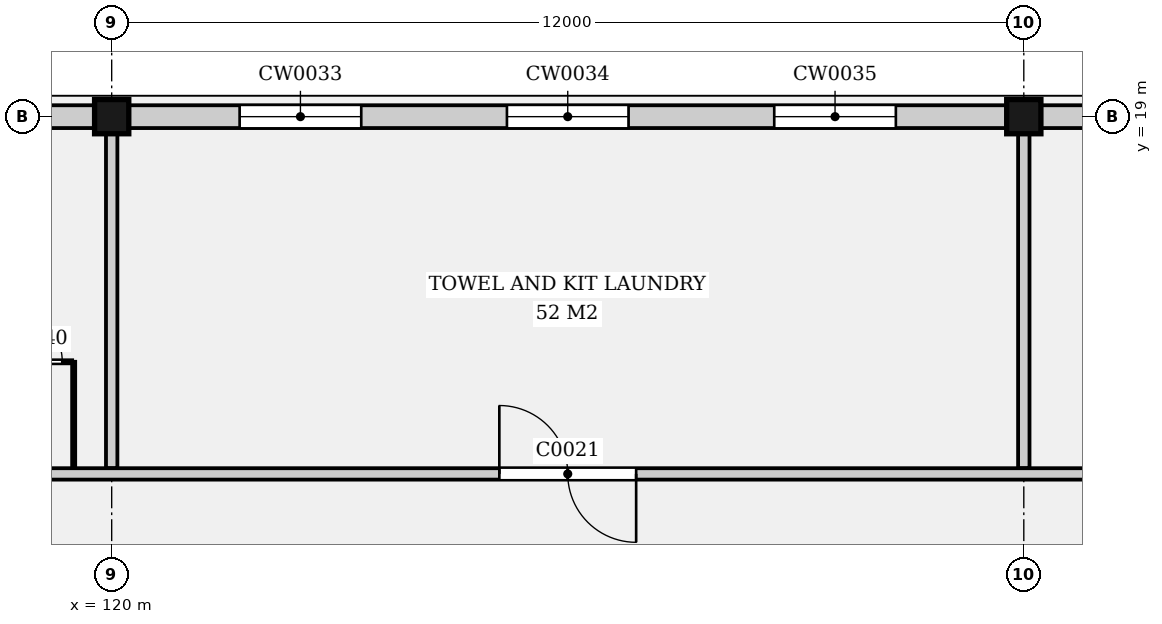
"""IFC4 building model, lengths in metres.
Left out: names, types, materials, properties, quantities, classifications, styles, units other than length and angle.
Written with IfcOpenShell. Run it as: python <this file> out.ifc"""

import sys

from ifc_helpers import new_model, si_unit, direction, frame, frame_2d, origin, origin_2d, place, context, subcontext, project, spatial, rectangle, extrude, element, fill, save


model = new_model("IFC4")
c1 = context("Model", 3, precision=1e-05, world=origin(), true_north=direction((0.0, 1.0)))
c2 = subcontext(c1, "Body", "Model", "MODEL_VIEW")
j1 = project(units=[si_unit("LENGTHUNIT", "METRE"), si_unit("PLANEANGLEUNIT", "RADIAN")], contexts=[c1])
p1 = place(None, origin())
s1 = spatial("IfcSite", under=j1, at=p1, CompositionType="ELEMENT")
p2 = place(p1, origin())
s2 = spatial("IfcBuilding", under=s1, at=p2, CompositionType="ELEMENT")
p3 = place(p2, origin())
s3 = spatial("IfcBuildingStorey", under=s2, at=p3, CompositionType="ELEMENT", Elevation=0.0)
for number, where, z_axis, x_axis in (
    (1, (120.0, 19.0, -0.25), (0.0, 0.0, 1.0), (1.0, 0.0, 0.0)),
    (2, (132.0, 19.0, -0.25), (0.0, 0.0, 1.0), (1.0, 0.0, 0.0)),
):
    element("IfcColumn", number, at=place(p3, frame(where, z_axis=z_axis, x_axis=x_axis)), inside=s3, PredefinedType="COLUMN", context=c2, shape_type="SweptSolid", body=[
        extrude(rectangle(XDim=0.45, YDim=0.45, at=origin_2d()), origin(), (0.0, 0.0, 1.0), 5.25),
    ])
p4 = place(p3, frame((108.225, 19.0, 0.0), z_axis=(0.0, 0.0, 1.0), x_axis=(1.0, 0.0, 0.0)))
e3 = element("IfcWall", 3, at=p4, inside=s3, PredefinedType="ELEMENTEDWALL", context=c2, shape_type="SweptSolid", body=[
    extrude(rectangle(XDim=11.55, YDim=0.3, at=frame_2d((5.775, 0.0))), origin(), (0.0, 0.0, 1.0), 4.6),
])
p5 = place(p4, frame((1.458, 0.0, 2.5)))
e4 = element("IfcOpeningElement", 4, at=p5, cuts=e3, PredefinedType="OPENING", context=c2, shape_type="SweptSolid", body=[
    extrude(rectangle(XDim=1.6, YDim=1.0, at=frame_2d((0.8, 0.5))), frame((0.0, 0.16, 0.0), z_axis=(0.0, -1.0, 0.0), x_axis=(1.0, 0.0, 0.0)), (0.0, 0.0, 1.0), 0.32),
])
p6 = place(p4, frame((8.492, 0.0, 2.5)))
e5 = element("IfcOpeningElement", 5, at=p6, cuts=e3, PredefinedType="OPENING", context=c2, shape_type="SweptSolid", body=[
    extrude(rectangle(XDim=1.6, YDim=1.0, at=frame_2d((0.8, 0.5))), frame((0.0, 0.16, 0.0), z_axis=(0.0, -1.0, 0.0), x_axis=(1.0, 0.0, 0.0)), (0.0, 0.0, 1.0), 0.32),
])
p7 = place(p4, frame((3.875, 0.0, 0.0)))
e6 = element("IfcOpeningElement", 6, at=p7, cuts=e3, PredefinedType="OPENING", context=c2, shape_type="SweptSolid", body=[
    extrude(rectangle(XDim=1.8, YDim=2.4, at=frame_2d((0.9, 1.2))), frame((0.0, 0.16, 0.0), z_axis=(0.0, -1.0, 0.0), x_axis=(1.0, 0.0, 0.0)), (0.0, 0.0, 1.0), 0.32),
])
p8 = place(p3, frame((120.225, 19.0, 0.0), z_axis=(0.0, 0.0, 1.0), x_axis=(1.0, 0.0, 0.0)))
e7 = element("IfcWall", 7, at=p8, inside=s3, PredefinedType="ELEMENTEDWALL", context=c2, shape_type="SweptSolid", body=[
    extrude(rectangle(XDim=11.55, YDim=0.3, at=frame_2d((5.775, 0.0))), origin(), (0.0, 0.0, 1.0), 4.6),
])
p9 = place(p8, frame((1.458, 0.0, 2.5)))
e8 = element("IfcOpeningElement", 8, at=p9, cuts=e7, PredefinedType="OPENING", context=c2, shape_type="SweptSolid", body=[
    extrude(rectangle(XDim=1.6, YDim=1.0, at=frame_2d((0.8, 0.5))), frame((0.0, 0.16, 0.0), z_axis=(0.0, -1.0, 0.0), x_axis=(1.0, 0.0, 0.0)), (0.0, 0.0, 1.0), 0.32),
])
p10 = place(p8, frame((4.975, 0.0, 2.5)))
e9 = element("IfcOpeningElement", 9, at=p10, cuts=e7, PredefinedType="OPENING", context=c2, shape_type="SweptSolid", body=[
    extrude(rectangle(XDim=1.6, YDim=1.0, at=frame_2d((0.8, 0.5))), frame((0.0, 0.16, 0.0), z_axis=(0.0, -1.0, 0.0), x_axis=(1.0, 0.0, 0.0)), (0.0, 0.0, 1.0), 0.32),
])
p11 = place(p8, frame((8.492, 0.0, 2.5)))
e10 = element("IfcOpeningElement", 10, at=p11, cuts=e7, PredefinedType="OPENING", context=c2, shape_type="SweptSolid", body=[
    extrude(rectangle(XDim=1.6, YDim=1.0, at=frame_2d((0.8, 0.5))), frame((0.0, 0.16, 0.0), z_axis=(0.0, -1.0, 0.0), x_axis=(1.0, 0.0, 0.0)), (0.0, 0.0, 1.0), 0.32),
])
p12 = place(p3, frame((132.225, 19.0, 0.0), z_axis=(0.0, 0.0, 1.0), x_axis=(1.0, 0.0, 0.0)))
e11 = element("IfcWall", 11, at=p12, inside=s3, PredefinedType="ELEMENTEDWALL", context=c2, shape_type="SweptSolid", body=[
    extrude(rectangle(XDim=11.55, YDim=0.3, at=frame_2d((5.775, 0.0))), origin(), (0.0, 0.0, 1.0), 4.6),
])
p13 = place(p12, frame((1.458, 0.0, 2.5)))
e12 = element("IfcOpeningElement", 12, at=p13, cuts=e11, PredefinedType="OPENING", context=c2, shape_type="SweptSolid", body=[
    extrude(rectangle(XDim=1.6, YDim=1.0, at=frame_2d((0.8, 0.5))), frame((0.0, 0.16, 0.0), z_axis=(0.0, -1.0, 0.0), x_axis=(1.0, 0.0, 0.0)), (0.0, 0.0, 1.0), 0.32),
])
p14 = place(p12, frame((8.492, 0.0, 2.5)))
e13 = element("IfcOpeningElement", 13, at=p14, cuts=e11, PredefinedType="OPENING", context=c2, shape_type="SweptSolid", body=[
    extrude(rectangle(XDim=1.6, YDim=1.0, at=frame_2d((0.8, 0.5))), frame((0.0, 0.16, 0.0), z_axis=(0.0, -1.0, 0.0), x_axis=(1.0, 0.0, 0.0)), (0.0, 0.0, 1.0), 0.32),
])
p15 = place(p12, frame((4.875, 0.0, 0.0)))
e14 = element("IfcOpeningElement", 14, at=p15, cuts=e11, PredefinedType="OPENING", context=c2, shape_type="SweptSolid", body=[
    extrude(rectangle(XDim=1.8, YDim=2.4, at=frame_2d((0.9, 1.2))), frame((0.0, 0.16, 0.0), z_axis=(0.0, -1.0, 0.0), x_axis=(1.0, 0.0, 0.0)), (0.0, 0.0, 1.0), 0.32),
])
p16 = place(p3, frame((55.3, 14.3, 0.0), z_axis=(0.0, 0.0, 1.0), x_axis=(1.0, 0.0, 0.0)))
e15 = element("IfcWall", 15, at=p16, inside=s3, PredefinedType="PARTITIONING", context=c2, shape_type="SweptSolid", body=[
    extrude(rectangle(XDim=93.4, YDim=0.15, at=frame_2d((46.7, 0.0))), origin(), (0.0, 0.0, 1.0), 4.6),
])
p17 = place(p16, frame((15.8, 0.0, 0.0)))
e16 = element("IfcOpeningElement", 16, at=p17, cuts=e15, PredefinedType="OPENING", context=c2, shape_type="SweptSolid", body=[
    extrude(rectangle(XDim=1.8, YDim=2.4, at=frame_2d((0.9, 1.2))), frame((0.0, 0.085, 0.0), z_axis=(0.0, -1.0, 0.0), x_axis=(1.0, 0.0, 0.0)), (0.0, 0.0, 1.0), 0.17),
])
p18 = place(p16, frame((32.2, 0.0, 0.0)))
e17 = element("IfcOpeningElement", 17, at=p18, cuts=e15, PredefinedType="OPENING", context=c2, shape_type="SweptSolid", body=[
    extrude(rectangle(XDim=1.0, YDim=2.1, at=frame_2d((0.5, 1.05))), frame((0.0, 0.085, 0.0), z_axis=(0.0, -1.0, 0.0), x_axis=(1.0, 0.0, 0.0)), (0.0, 0.0, 1.0), 0.17),
])
p19 = place(p16, frame((38.2, 0.0, 0.0)))
e18 = element("IfcOpeningElement", 18, at=p19, cuts=e15, PredefinedType="OPENING", context=c2, shape_type="SweptSolid", body=[
    extrude(rectangle(XDim=1.0, YDim=2.1, at=frame_2d((0.5, 1.05))), frame((0.0, 0.085, 0.0), z_axis=(0.0, -1.0, 0.0), x_axis=(1.0, 0.0, 0.0)), (0.0, 0.0, 1.0), 0.17),
])
p20 = place(p16, frame((43.2, 0.0, 0.0)))
e19 = element("IfcOpeningElement", 19, at=p20, cuts=e15, PredefinedType="OPENING", context=c2, shape_type="SweptSolid", body=[
    extrude(rectangle(XDim=1.0, YDim=2.1, at=frame_2d((0.5, 1.05))), frame((0.0, 0.085, 0.0), z_axis=(0.0, -1.0, 0.0), x_axis=(1.0, 0.0, 0.0)), (0.0, 0.0, 1.0), 0.17),
])
p21 = place(p16, frame((49.2, 0.0, 0.0)))
e20 = element("IfcOpeningElement", 20, at=p21, cuts=e15, PredefinedType="OPENING", context=c2, shape_type="SweptSolid", body=[
    extrude(rectangle(XDim=1.0, YDim=2.1, at=frame_2d((0.5, 1.05))), frame((0.0, 0.085, 0.0), z_axis=(0.0, -1.0, 0.0), x_axis=(1.0, 0.0, 0.0)), (0.0, 0.0, 1.0), 0.17),
])
p22 = place(p16, frame((57.8, 0.0, 0.0)))
e21 = element("IfcOpeningElement", 21, at=p22, cuts=e15, PredefinedType="OPENING", context=c2, shape_type="SweptSolid", body=[
    extrude(rectangle(XDim=1.8, YDim=2.4, at=frame_2d((0.9, 1.2))), frame((0.0, 0.085, 0.0), z_axis=(0.0, -1.0, 0.0), x_axis=(1.0, 0.0, 0.0)), (0.0, 0.0, 1.0), 0.17),
])
p23 = place(p16, frame((69.8, 0.0, 0.0)))
e22 = element("IfcOpeningElement", 22, at=p23, cuts=e15, PredefinedType="OPENING", context=c2, shape_type="SweptSolid", body=[
    extrude(rectangle(XDim=1.8, YDim=2.4, at=frame_2d((0.9, 1.2))), frame((0.0, 0.085, 0.0), z_axis=(0.0, -1.0, 0.0), x_axis=(1.0, 0.0, 0.0)), (0.0, 0.0, 1.0), 0.17),
])
p24 = place(p16, frame((82.2, 0.0, 0.0)))
e23 = element("IfcOpeningElement", 23, at=p24, cuts=e15, PredefinedType="OPENING", context=c2, shape_type="SweptSolid", body=[
    extrude(rectangle(XDim=1.0, YDim=2.1, at=frame_2d((0.5, 1.05))), frame((0.0, 0.085, 0.0), z_axis=(0.0, -1.0, 0.0), x_axis=(1.0, 0.0, 0.0)), (0.0, 0.0, 1.0), 0.17),
])
for number, where, z_axis, x_axis in (
    (24, (120.0, 14.375, 0.0), (0.0, 0.0, 1.0), (0.0, 1.0, 0.0)),
    (25, (132.0, 14.375, 0.0), (0.0, 0.0, 1.0), (0.0, 1.0, 0.0)),
):
    element("IfcWall", number, at=place(p3, frame(where, z_axis=z_axis, x_axis=x_axis)), inside=s3, PredefinedType="PARTITIONING", context=c2, shape_type="SweptSolid", body=[
        extrude(rectangle(XDim=4.4, YDim=0.15, at=frame_2d((2.2, 0.0))), origin(), (0.0, 0.0, 1.0), 4.6),
    ])
p25 = place(p3, frame((119.5, 14.375, 0.0), z_axis=(0.0, 0.0, 1.0), x_axis=(0.0, 1.0, 0.0)))
e26 = element("IfcWall", 26, at=p25, inside=s3, PredefinedType="PARTITIONING", context=c2, shape_type="SweptSolid", body=[
    extrude(rectangle(XDim=1.4, YDim=0.04, at=frame_2d((0.7, 0.0))), origin(), (0.0, 0.0, 1.0), 2.4),
])
p26 = place(p3, frame((118.52, 15.775, 0.0), z_axis=(0.0, 0.0, 1.0), x_axis=(1.0, 0.0, 0.0)))
e27 = element("IfcWall", 27, at=p26, inside=s3, PredefinedType="PARTITIONING", context=c2, shape_type="SweptSolid", body=[
    extrude(rectangle(XDim=0.96, YDim=0.04, at=frame_2d((0.48, 0.0))), origin(), (0.0, 0.0, 1.0), 2.4),
])
p27 = place(p26, frame((0.13, 0.0, 0.0)))
e28 = element("IfcOpeningElement", 28, at=p27, cuts=e27, PredefinedType="OPENING", context=c2, shape_type="SweptSolid", body=[
    extrude(rectangle(XDim=0.7, YDim=2.0, at=frame_2d((0.35, 1.0))), frame((0.0, 0.03, 0.0), z_axis=(0.0, -1.0, 0.0), x_axis=(1.0, 0.0, 0.0)), (0.0, 0.0, 1.0), 0.06),
])
p28 = place(p9, origin())
e29 = element("IfcWindow", 29, at=p28, inside=s3, PartitioningType="SINGLE_PANEL", PredefinedType="WINDOW", context=c2, shape_type="SweptSolid", body=[
    extrude(rectangle(XDim=1.6, YDim=1.0, at=frame_2d((0.8, 0.5))), frame((0.0, 0.03, 0.0), z_axis=(0.0, -1.0, 0.0), x_axis=(1.0, 0.0, 0.0)), (0.0, 0.0, 1.0), 0.06),
])
fill(e8, e29)
p29 = place(p10, origin())
e30 = element("IfcWindow", 30, at=p29, inside=s3, PartitioningType="SINGLE_PANEL", PredefinedType="WINDOW", context=c2, shape_type="SweptSolid", body=[
    extrude(rectangle(XDim=1.6, YDim=1.0, at=frame_2d((0.8, 0.5))), frame((0.0, 0.03, 0.0), z_axis=(0.0, -1.0, 0.0), x_axis=(1.0, 0.0, 0.0)), (0.0, 0.0, 1.0), 0.06),
])
fill(e9, e30)
p30 = place(p11, origin())
e31 = element("IfcWindow", 31, at=p30, inside=s3, PartitioningType="SINGLE_PANEL", PredefinedType="WINDOW", context=c2, shape_type="SweptSolid", body=[
    extrude(rectangle(XDim=1.6, YDim=1.0, at=frame_2d((0.8, 0.5))), frame((0.0, 0.03, 0.0), z_axis=(0.0, -1.0, 0.0), x_axis=(1.0, 0.0, 0.0)), (0.0, 0.0, 1.0), 0.06),
])
fill(e10, e31)
p31 = place(p23, origin())
e32 = element("IfcDoor", 32, at=p31, inside=s3, OperationType="DOUBLE_DOOR_SINGLE_SWING", PredefinedType="DOOR", context=c2, shape_type="SweptSolid", body=[
    extrude(rectangle(XDim=1.8, YDim=2.4, at=frame_2d((0.9, 1.2))), frame((0.0, 0.025, 0.0), z_axis=(0.0, -1.0, 0.0), x_axis=(1.0, 0.0, 0.0)), (0.0, 0.0, 1.0), 0.05),
])
fill(e22, e32)
p32 = place(p27, origin())
e33 = element("IfcDoor", 33, at=p32, inside=s3, OperationType="SINGLE_SWING_LEFT", PredefinedType="DOOR", context=c2, shape_type="SweptSolid", body=[
    extrude(rectangle(XDim=0.7, YDim=2.0, at=frame_2d((0.35, 1.0))), frame((0.0, 0.02, 0.0), z_axis=(0.0, -1.0, 0.0), x_axis=(1.0, 0.0, 0.0)), (0.0, 0.0, 1.0), 0.04),
])
fill(e28, e33)
save(model, sys.argv[1])
